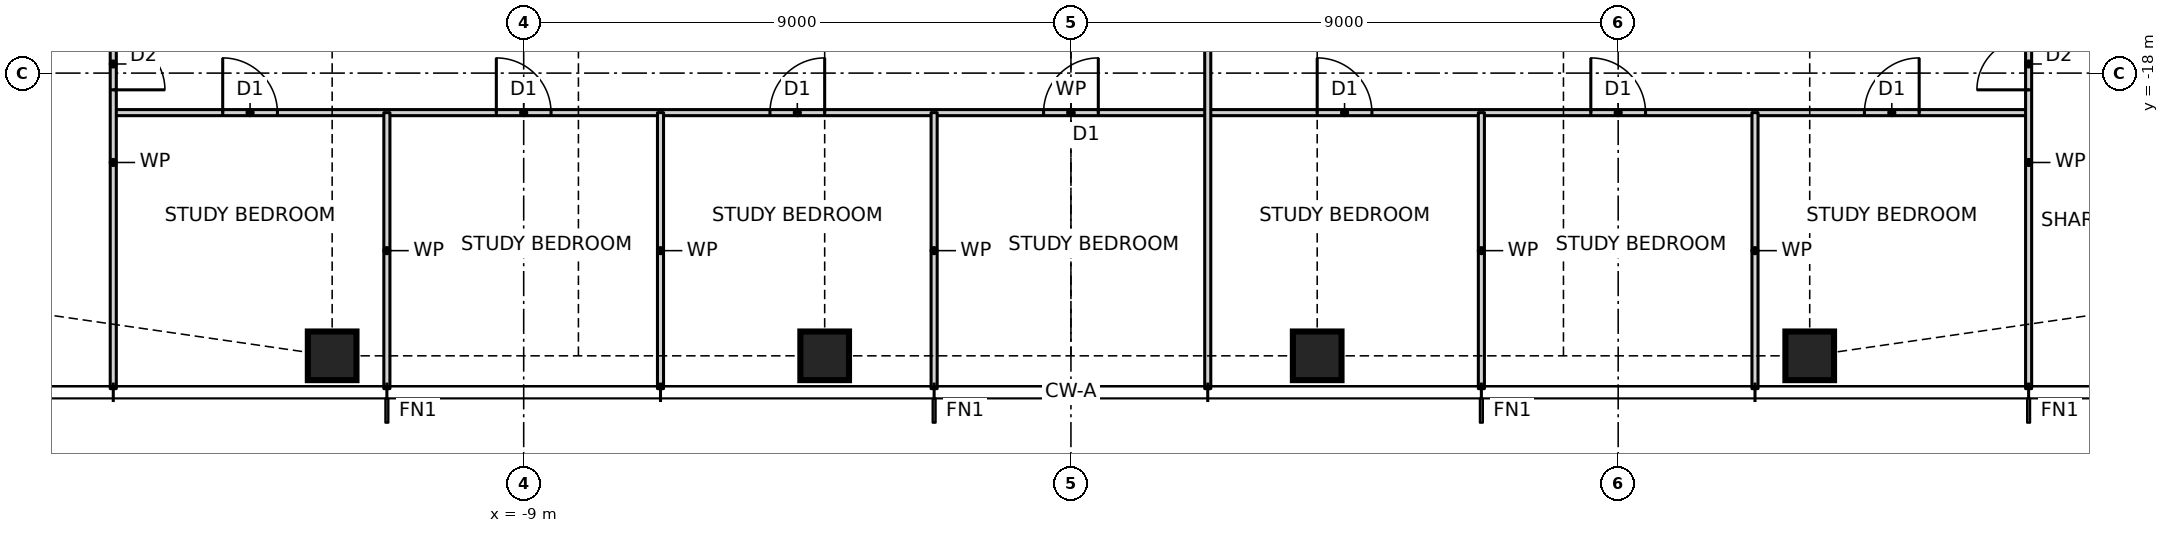
"""IFC4 building model, lengths in metres.
Left out: names, types, materials, properties, quantities, classifications, styles, units other than length and angle.
Written with IfcOpenShell. Run it as: python <this file> out.ifc"""

import sys

from ifc_helpers import new_model, si_unit, direction, frame, frame_2d, origin, origin_2d, place, context, subcontext, project, spatial, rectangle, hollow_rectangle, extrude, element, fill, save


model = new_model("IFC4")
c1 = context("Model", 3, precision=1e-05, world=origin(), true_north=direction((0.0, 1.0)))
c2 = subcontext(c1, "Body", "Model", "MODEL_VIEW")
j1 = project(units=[si_unit("LENGTHUNIT", "METRE"), si_unit("PLANEANGLEUNIT", "RADIAN")], contexts=[c1])
p1 = place(None, origin())
s1 = spatial("IfcSite", under=j1, at=p1, CompositionType="ELEMENT")
p2 = place(p1, origin())
s2 = spatial("IfcBuilding", under=s1, at=p2, CompositionType="ELEMENT")
p3 = place(p2, frame((0.0, 0.0, 53.5)))
s3 = spatial("IfcBuildingStorey", under=s2, at=p3, CompositionType="ELEMENT", Elevation=53.5)
for number, where, z_axis, x_axis in (
    (1, (-12.15, -22.65, 0.0), (0.0, 0.0, 1.0), (1.0, 0.0, 0.0)),
    (2, (-4.05, -22.65, 0.0), (0.0, 0.0, 1.0), (1.0, 0.0, 0.0)),
    (3, (4.05, -22.65, 0.0), (0.0, 0.0, 1.0), (1.0, 0.0, 0.0)),
    (4, (12.15, -22.65, 0.0), (0.0, 0.0, 1.0), (1.0, 0.0, 0.0)),
):
    element("IfcColumn", number, at=place(p3, frame(where, z_axis=z_axis, x_axis=x_axis)), inside=s3, PredefinedType="COLUMN", context=c2, shape_type="SweptSolid", body=[
        extrude(hollow_rectangle(XDim=0.8, YDim=0.8, WallThickness=0.09, at=origin_2d()), origin(), (0.0, 0.0, 1.0), 3.5),
    ])
p4 = place(p3, frame((-15.75, -18.65, 0.0), z_axis=(0.0, 0.0, 1.0), x_axis=(1.0, 0.0, 0.0)))
e5 = element("IfcWall", 5, at=p4, inside=s3, PredefinedType="PARTITIONING", context=c2, shape_type="SweptSolid", body=[
    extrude(rectangle(XDim=31.5, YDim=0.1, at=frame_2d((15.75, 0.0))), origin(), (0.0, 0.0, 1.0), 3.27),
])
p5 = place(p4, frame((1.8, 0.0, 0.0)))
e6 = element("IfcOpeningElement", 6, at=p5, cuts=e5, PredefinedType="OPENING", context=c2, shape_type="SweptSolid", body=[
    extrude(rectangle(XDim=0.9, YDim=2.1, at=frame_2d((0.45, 1.05))), frame((0.0, 0.06, 0.0), z_axis=(0.0, -1.0, 0.0), x_axis=(1.0, 0.0, 0.0)), (0.0, 0.0, 1.0), 0.12),
])
p6 = place(p4, frame((6.3, 0.0, 0.0)))
e7 = element("IfcOpeningElement", 7, at=p6, cuts=e5, PredefinedType="OPENING", context=c2, shape_type="SweptSolid", body=[
    extrude(rectangle(XDim=0.9, YDim=2.1, at=frame_2d((0.45, 1.05))), frame((0.0, 0.06, 0.0), z_axis=(0.0, -1.0, 0.0), x_axis=(1.0, 0.0, 0.0)), (0.0, 0.0, 1.0), 0.12),
])
p7 = place(p4, frame((10.8, 0.0, 0.0)))
e8 = element("IfcOpeningElement", 8, at=p7, cuts=e5, PredefinedType="OPENING", context=c2, shape_type="SweptSolid", body=[
    extrude(rectangle(XDim=0.9, YDim=2.1, at=frame_2d((0.45, 1.05))), frame((0.0, 0.06, 0.0), z_axis=(0.0, -1.0, 0.0), x_axis=(1.0, 0.0, 0.0)), (0.0, 0.0, 1.0), 0.12),
])
p8 = place(p4, frame((15.3, 0.0, 0.0)))
e9 = element("IfcOpeningElement", 9, at=p8, cuts=e5, PredefinedType="OPENING", context=c2, shape_type="SweptSolid", body=[
    extrude(rectangle(XDim=0.9, YDim=2.1, at=frame_2d((0.45, 1.05))), frame((0.0, 0.06, 0.0), z_axis=(0.0, -1.0, 0.0), x_axis=(1.0, 0.0, 0.0)), (0.0, 0.0, 1.0), 0.12),
])
p9 = place(p4, frame((19.8, 0.0, 0.0)))
e10 = element("IfcOpeningElement", 10, at=p9, cuts=e5, PredefinedType="OPENING", context=c2, shape_type="SweptSolid", body=[
    extrude(rectangle(XDim=0.9, YDim=2.1, at=frame_2d((0.45, 1.05))), frame((0.0, 0.06, 0.0), z_axis=(0.0, -1.0, 0.0), x_axis=(1.0, 0.0, 0.0)), (0.0, 0.0, 1.0), 0.12),
])
p10 = place(p4, frame((24.3, 0.0, 0.0)))
e11 = element("IfcOpeningElement", 11, at=p10, cuts=e5, PredefinedType="OPENING", context=c2, shape_type="SweptSolid", body=[
    extrude(rectangle(XDim=0.9, YDim=2.1, at=frame_2d((0.45, 1.05))), frame((0.0, 0.06, 0.0), z_axis=(0.0, -1.0, 0.0), x_axis=(1.0, 0.0, 0.0)), (0.0, 0.0, 1.0), 0.12),
])
p11 = place(p4, frame((28.8, 0.0, 0.0)))
e12 = element("IfcOpeningElement", 12, at=p11, cuts=e5, PredefinedType="OPENING", context=c2, shape_type="SweptSolid", body=[
    extrude(rectangle(XDim=0.9, YDim=2.1, at=frame_2d((0.45, 1.05))), frame((0.0, 0.06, 0.0), z_axis=(0.0, -1.0, 0.0), x_axis=(1.0, 0.0, 0.0)), (0.0, 0.0, 1.0), 0.12),
])
p12 = place(p3, frame((15.75, -23.19, 0.0), z_axis=(0.0, 0.0, 1.0), x_axis=(0.0, 1.0, 0.0)))
e13 = element("IfcWall", 13, at=p12, inside=s3, PredefinedType="PARTITIONING", context=c2, shape_type="SweptSolid", body=[
    extrude(rectangle(XDim=7.44, YDim=0.1, at=frame_2d((3.72, 0.0))), origin(), (0.0, 0.0, 1.0), 3.27),
])
p13 = place(p12, frame((4.915, 0.0, 0.0)))
e14 = element("IfcOpeningElement", 14, at=p13, cuts=e13, PredefinedType="OPENING", context=c2, shape_type="SweptSolid", body=[
    extrude(rectangle(XDim=0.85, YDim=2.1, at=frame_2d((0.425, 1.05))), frame((0.0, 0.06, 0.0), z_axis=(0.0, -1.0, 0.0), x_axis=(1.0, 0.0, 0.0)), (0.0, 0.0, 1.0), 0.12),
])
for number, where, z_axis, x_axis in (
    (15, (11.25, -23.19, 0.0), (0.0, 0.0, 1.0), (0.0, 1.0, 0.0)),
    (16, (6.75, -23.19, 0.0), (0.0, 0.0, 1.0), (0.0, 1.0, 0.0)),
):
    element("IfcWall", number, at=place(p3, frame(where, z_axis=z_axis, x_axis=x_axis)), inside=s3, PredefinedType="PARTITIONING", context=c2, shape_type="SweptSolid", body=[
        extrude(rectangle(XDim=4.54, YDim=0.1, at=frame_2d((2.27, 0.0))), origin(), (0.0, 0.0, 1.0), 3.27),
    ])
p14 = place(p3, frame((2.25, -23.19, 0.0), z_axis=(0.0, 0.0, 1.0), x_axis=(0.0, 1.0, 0.0)))
e17 = element("IfcWall", 17, at=p14, inside=s3, PredefinedType="PARTITIONING", context=c2, shape_type="SweptSolid", body=[
    extrude(rectangle(XDim=11.59, YDim=0.1, at=frame_2d((5.795, 0.0))), origin(), (0.0, 0.0, 1.0), 3.27),
])
for number, where, z_axis, x_axis in (
    (18, (-2.25, -23.19, 0.0), (0.0, 0.0, 1.0), (0.0, 1.0, 0.0)),
    (19, (-6.75, -23.19, 0.0), (0.0, 0.0, 1.0), (0.0, 1.0, 0.0)),
    (20, (-11.25, -23.19, 0.0), (0.0, 0.0, 1.0), (0.0, 1.0, 0.0)),
):
    element("IfcWall", number, at=place(p3, frame(where, z_axis=z_axis, x_axis=x_axis)), inside=s3, PredefinedType="PARTITIONING", context=c2, shape_type="SweptSolid", body=[
        extrude(rectangle(XDim=4.54, YDim=0.1, at=frame_2d((2.27, 0.0))), origin(), (0.0, 0.0, 1.0), 3.27),
    ])
p15 = place(p3, frame((-15.75, -23.19, 0.0), z_axis=(0.0, 0.0, 1.0), x_axis=(0.0, 1.0, 0.0)))
e21 = element("IfcWall", 21, at=p15, inside=s3, PredefinedType="PARTITIONING", context=c2, shape_type="SweptSolid", body=[
    extrude(rectangle(XDim=7.44, YDim=0.1, at=frame_2d((3.72, 0.0))), origin(), (0.0, 0.0, 1.0), 3.27),
])
p16 = place(p15, frame((4.915, 0.0, 0.0)))
e22 = element("IfcOpeningElement", 22, at=p16, cuts=e21, PredefinedType="OPENING", context=c2, shape_type="SweptSolid", body=[
    extrude(rectangle(XDim=0.85, YDim=2.1, at=frame_2d((0.425, 1.05))), frame((0.0, 0.06, 0.0), z_axis=(0.0, -1.0, 0.0), x_axis=(1.0, 0.0, 0.0)), (0.0, 0.0, 1.0), 0.12),
])
p17 = place(p5, origin())
e23 = element("IfcDoor", 23, at=p17, inside=s3, OperationType="SINGLE_SWING_LEFT", PredefinedType="DOOR", context=c2, shape_type="SweptSolid", body=[
    extrude(rectangle(XDim=0.9, YDim=2.1, at=frame_2d((0.45, 1.05))), frame((0.0, 0.025, 0.0), z_axis=(0.0, -1.0, 0.0), x_axis=(1.0, 0.0, 0.0)), (0.0, 0.0, 1.0), 0.05),
])
fill(e6, e23)
p18 = place(p6, origin())
e24 = element("IfcDoor", 24, at=p18, inside=s3, OperationType="SINGLE_SWING_LEFT", PredefinedType="DOOR", context=c2, shape_type="SweptSolid", body=[
    extrude(rectangle(XDim=0.9, YDim=2.1, at=frame_2d((0.45, 1.05))), frame((0.0, 0.025, 0.0), z_axis=(0.0, -1.0, 0.0), x_axis=(1.0, 0.0, 0.0)), (0.0, 0.0, 1.0), 0.05),
])
fill(e7, e24)
p19 = place(p7, origin())
e25 = element("IfcDoor", 25, at=p19, inside=s3, OperationType="SINGLE_SWING_RIGHT", PredefinedType="DOOR", context=c2, shape_type="SweptSolid", body=[
    extrude(rectangle(XDim=0.9, YDim=2.1, at=frame_2d((0.45, 1.05))), frame((0.0, 0.025, 0.0), z_axis=(0.0, -1.0, 0.0), x_axis=(1.0, 0.0, 0.0)), (0.0, 0.0, 1.0), 0.05),
])
fill(e8, e25)
p20 = place(p8, origin())
e26 = element("IfcDoor", 26, at=p20, inside=s3, OperationType="SINGLE_SWING_RIGHT", PredefinedType="DOOR", context=c2, shape_type="SweptSolid", body=[
    extrude(rectangle(XDim=0.9, YDim=2.1, at=frame_2d((0.45, 1.05))), frame((0.0, 0.025, 0.0), z_axis=(0.0, -1.0, 0.0), x_axis=(1.0, 0.0, 0.0)), (0.0, 0.0, 1.0), 0.05),
])
fill(e9, e26)
p21 = place(p9, origin())
e27 = element("IfcDoor", 27, at=p21, inside=s3, OperationType="SINGLE_SWING_LEFT", PredefinedType="DOOR", context=c2, shape_type="SweptSolid", body=[
    extrude(rectangle(XDim=0.9, YDim=2.1, at=frame_2d((0.45, 1.05))), frame((0.0, 0.025, 0.0), z_axis=(0.0, -1.0, 0.0), x_axis=(1.0, 0.0, 0.0)), (0.0, 0.0, 1.0), 0.05),
])
fill(e10, e27)
p22 = place(p10, origin())
e28 = element("IfcDoor", 28, at=p22, inside=s3, OperationType="SINGLE_SWING_LEFT", PredefinedType="DOOR", context=c2, shape_type="SweptSolid", body=[
    extrude(rectangle(XDim=0.9, YDim=2.1, at=frame_2d((0.45, 1.05))), frame((0.0, 0.025, 0.0), z_axis=(0.0, -1.0, 0.0), x_axis=(1.0, 0.0, 0.0)), (0.0, 0.0, 1.0), 0.05),
])
fill(e11, e28)
p23 = place(p11, origin())
e29 = element("IfcDoor", 29, at=p23, inside=s3, OperationType="SINGLE_SWING_RIGHT", PredefinedType="DOOR", context=c2, shape_type="SweptSolid", body=[
    extrude(rectangle(XDim=0.9, YDim=2.1, at=frame_2d((0.45, 1.05))), frame((0.0, 0.025, 0.0), z_axis=(0.0, -1.0, 0.0), x_axis=(1.0, 0.0, 0.0)), (0.0, 0.0, 1.0), 0.05),
])
fill(e12, e29)
p24 = place(p16, frame((0.85, 0.0, 0.0), z_axis=(0.0, 0.0, 1.0), x_axis=(-1.0, 0.0, 0.0)))
e30 = element("IfcDoor", 30, at=p24, inside=s3, OperationType="SINGLE_SWING_RIGHT", PredefinedType="DOOR", context=c2, shape_type="SweptSolid", body=[
    extrude(rectangle(XDim=0.85, YDim=2.1, at=frame_2d((0.425, 1.05))), frame((0.0, 0.025, 0.0), z_axis=(0.0, -1.0, 0.0), x_axis=(1.0, 0.0, 0.0)), (0.0, 0.0, 1.0), 0.05),
])
fill(e22, e30)
p25 = place(p13, origin())
e31 = element("IfcDoor", 31, at=p25, inside=s3, OperationType="SINGLE_SWING_LEFT", PredefinedType="DOOR", context=c2, shape_type="SweptSolid", body=[
    extrude(rectangle(XDim=0.85, YDim=2.1, at=frame_2d((0.425, 1.05))), frame((0.0, 0.025, 0.0), z_axis=(0.0, -1.0, 0.0), x_axis=(1.0, 0.0, 0.0)), (0.0, 0.0, 1.0), 0.05),
])
fill(e14, e31)
save(model, sys.argv[1])
